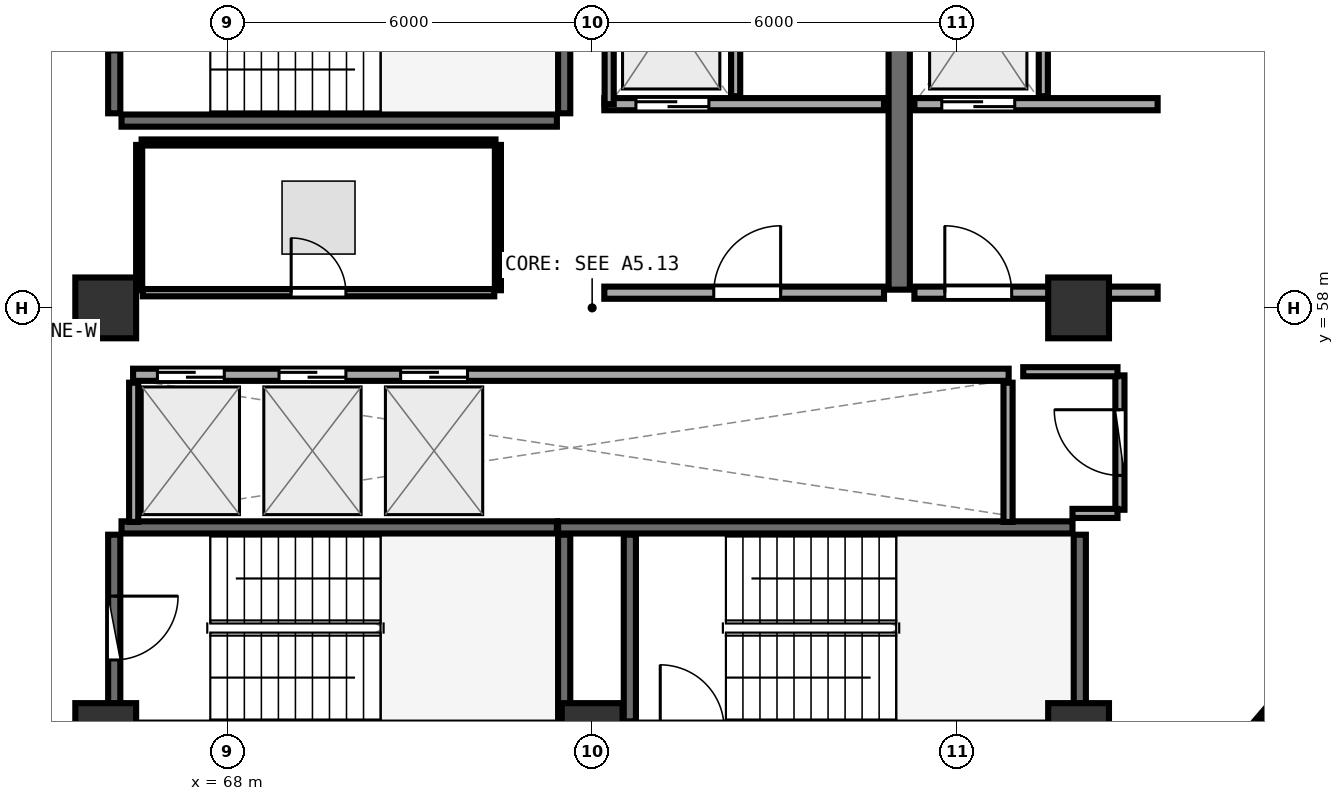
"""IFC4 building model, lengths in metres.
Left out: names, types, materials, properties, quantities, classifications, styles, units other than length and angle.
Written with IfcOpenShell. Run it as: python <this file> out.ifc"""

import sys

from ifc_helpers import new_model, si_unit, direction, frame, frame_2d, origin, origin_2d, place, context, subcontext, project, spatial, rectangle, extrude, element, fill, save


model = new_model("IFC4")
c1 = context("Model", 3, precision=1e-05, world=origin(), true_north=direction((0.0, 1.0)))
c2 = subcontext(c1, "Body", "Model", "MODEL_VIEW")
j1 = project(units=[si_unit("LENGTHUNIT", "METRE"), si_unit("PLANEANGLEUNIT", "RADIAN")], contexts=[c1])
p1 = place(None, origin())
s1 = spatial("IfcSite", under=j1, at=p1, CompositionType="ELEMENT")
p2 = place(p1, origin())
s2 = spatial("IfcBuilding", under=s1, at=p2, CompositionType="ELEMENT")
p3 = place(p2, frame((0.0, 0.0, 234.45)))
s3 = spatial("IfcBuildingStorey", under=s2, at=p3, CompositionType="ELEMENT", Elevation=234.45)
for number, where, z_axis, x_axis in (
    (1, (66.0, 51.0, 0.0), (0.0, 0.0, 1.0), (1.0, 0.0, 0.0)),
    (2, (74.0, 51.0, 0.0), (0.0, 0.0, 1.0), (1.0, 0.0, 0.0)),
    (3, (82.0, 51.0, 0.0), (0.0, 0.0, 1.0), (1.0, 0.0, 0.0)),
    (4, (82.0, 58.0, 0.0), (0.0, 0.0, 1.0), (1.0, 0.0, 0.0)),
    (5, (66.0, 58.0, 0.0), (0.0, 0.0, 1.0), (1.0, 0.0, 0.0)),
):
    element("IfcColumn", number, at=place(p3, frame(where, z_axis=z_axis, x_axis=x_axis)), inside=s3, PredefinedType="PILASTER", context=c2, shape_type="SweptSolid", body=[
        extrude(rectangle(XDim=1.0, YDim=1.0, at=origin_2d()), origin(), (0.0, 0.0, 1.0), 3.75),
    ])
p4 = place(p3, frame((66.26, 61.08, 0.0), z_axis=(0.0, 0.0, 1.0), x_axis=(1.0, 0.0, 0.0)))
e6 = element("IfcWall", 6, at=p4, inside=s3, PredefinedType="SHEAR", context=c2, shape_type="SweptSolid", body=[
    extrude(rectangle(XDim=7.16, YDim=0.2, at=frame_2d((3.58, 0.0))), origin(), (0.0, 0.0, 1.0), 3.49),
])
p5 = place(p3, frame((73.54, 61.2, 0.0), z_axis=(0.0, 0.0, 1.0), x_axis=(0.0, 1.0, 0.0)))
e7 = element("IfcWall", 7, at=p5, inside=s3, PredefinedType="SHEAR", context=c2, shape_type="SweptSolid", body=[
    extrude(rectangle(XDim=3.07, YDim=0.2, at=frame_2d((1.535, 0.0))), origin(), (0.0, 0.0, 1.0), 3.49),
])
p6 = place(p3, frame((66.14, 64.27, 0.0), z_axis=(0.0, 0.0, 1.0), x_axis=(0.0, -1.0, 0.0)))
e8 = element("IfcWall", 8, at=p6, inside=s3, PredefinedType="SHEAR", context=c2, shape_type="SweptSolid", body=[
    extrude(rectangle(XDim=3.07, YDim=0.2, at=frame_2d((1.535, 0.0))), origin(), (0.0, 0.0, 1.0), 3.49),
])
p7 = place(p6, frame((1.01, 0.0, 0.0)))
e9 = element("IfcOpeningElement", 9, at=p7, cuts=e8, PredefinedType="OPENING", context=c2, shape_type="SweptSolid", body=[
    extrude(rectangle(XDim=1.05, YDim=2.1, at=frame_2d((0.525, 1.05))), frame((0.0, 0.11, 0.0), z_axis=(0.0, -1.0, 0.0), x_axis=(1.0, 0.0, 0.0)), (0.0, 0.0, 1.0), 0.22),
])
p8 = place(p3, frame((82.02, 51.2, 0.0), z_axis=(0.0, 0.0, 1.0), x_axis=(0.0, 1.0, 0.0)))
e10 = element("IfcWall", 10, at=p8, inside=s3, PredefinedType="SHEAR", context=c2, shape_type="SweptSolid", body=[
    extrude(rectangle(XDim=3.07, YDim=0.2, at=frame_2d((1.535, 0.0))), origin(), (0.0, 0.0, 1.0), 3.49),
])
p9 = place(p3, frame((81.9, 54.39, 0.0), z_axis=(0.0, 0.0, 1.0), x_axis=(-1.0, 0.0, 0.0)))
e11 = element("IfcWall", 11, at=p9, inside=s3, PredefinedType="SHEAR", context=c2, shape_type="SweptSolid", body=[
    extrude(rectangle(XDim=8.46, YDim=0.2, at=frame_2d((4.23, 0.0))), origin(), (0.0, 0.0, 1.0), 3.49),
])
for number, where, z_axis, x_axis in (
    (12, (74.62, 54.27, 0.0), (0.0, 0.0, 1.0), (0.0, -1.0, 0.0)),
    (13, (73.54, 51.2, 0.0), (0.0, 0.0, 1.0), (0.0, 1.0, 0.0)),
):
    element("IfcWall", number, at=place(p3, frame(where, z_axis=z_axis, x_axis=x_axis)), inside=s3, PredefinedType="SHEAR", context=c2, shape_type="SweptSolid", body=[
        extrude(rectangle(XDim=3.07, YDim=0.2, at=frame_2d((1.535, 0.0))), origin(), (0.0, 0.0, 1.0), 3.49),
    ])
p10 = place(p3, frame((73.42, 54.39, 0.0), z_axis=(0.0, 0.0, 1.0), x_axis=(-1.0, 0.0, 0.0)))
e14 = element("IfcWall", 14, at=p10, inside=s3, PredefinedType="SHEAR", context=c2, shape_type="SweptSolid", body=[
    extrude(rectangle(XDim=7.16, YDim=0.2, at=frame_2d((3.58, 0.0))), origin(), (0.0, 0.0, 1.0), 3.49),
])
p11 = place(p3, frame((66.14, 54.27, 0.0), z_axis=(0.0, 0.0, 1.0), x_axis=(0.0, -1.0, 0.0)))
e15 = element("IfcWall", 15, at=p11, inside=s3, PredefinedType="SHEAR", context=c2, shape_type="SweptSolid", body=[
    extrude(rectangle(XDim=3.07, YDim=0.2, at=frame_2d((1.535, 0.0))), origin(), (0.0, 0.0, 1.0), 3.49),
])
p12 = place(p11, frame((1.01, 0.0, 0.0)))
e16 = element("IfcOpeningElement", 16, at=p12, cuts=e15, PredefinedType="OPENING", context=c2, shape_type="SweptSolid", body=[
    extrude(rectangle(XDim=1.05, YDim=2.1, at=frame_2d((0.525, 1.05))), frame((0.0, 0.11, 0.0), z_axis=(0.0, -1.0, 0.0), x_axis=(1.0, 0.0, 0.0)), (0.0, 0.0, 1.0), 0.22),
])
p13 = place(p3, frame((79.05, 58.3, 0.0), z_axis=(0.0, 0.0, 1.0), x_axis=(0.0, 1.0, 0.0)))
e17 = element("IfcWall", 17, at=p13, inside=s3, PredefinedType="SHEAR", context=c2, shape_type="SweptSolid", body=[
    extrude(rectangle(XDim=6.3, YDim=0.35, at=frame_2d((3.15, 0.0))), origin(), (0.0, 0.0, 1.0), 3.49),
])
p14 = place(p3, frame((74.2, 61.35, 0.0), z_axis=(0.0, 0.0, 1.0), x_axis=(1.0, 0.0, 0.0)))
e18 = element("IfcWall", 18, at=p14, inside=s3, PredefinedType="SOLIDWALL", context=c2, shape_type="SweptSolid", body=[
    extrude(rectangle(XDim=4.6, YDim=0.2, at=frame_2d((2.3, 0.0))), origin(), (0.0, 0.0, 1.0), 3.48),
])
p15 = place(p14, frame((0.52, 0.0, 0.0)))
e19 = element("IfcOpeningElement", 19, at=p15, cuts=e18, PredefinedType="OPENING", context=c2, shape_type="SweptSolid", body=[
    extrude(rectangle(XDim=1.2, YDim=2.15, at=frame_2d((0.6, 1.075))), frame((0.0, 0.11, 0.0), z_axis=(0.0, -1.0, 0.0), x_axis=(1.0, 0.0, 0.0)), (0.0, 0.0, 1.0), 0.22),
])
p16 = place(p3, frame((74.28, 61.35, 0.0), z_axis=(0.0, 0.0, 1.0), x_axis=(0.0, 1.0, 0.0)))
e20 = element("IfcWall", 20, at=p16, inside=s3, PredefinedType="PARTITIONING", context=c2, shape_type="SweptSolid", body=[
    extrude(rectangle(XDim=2.97, YDim=0.15, at=frame_2d((1.485, 0.0))), origin(), (0.0, 0.0, 1.0), 3.48),
])
p17 = place(p3, frame((76.36, 61.48, 0.0), z_axis=(0.0, 0.0, 1.0), x_axis=(0.0, 1.0, 0.0)))
e21 = element("IfcWall", 21, at=p17, inside=s3, PredefinedType="PARTITIONING", context=c2, shape_type="SweptSolid", body=[
    extrude(rectangle(XDim=2.84, YDim=0.15, at=frame_2d((1.42, 0.0))), origin(), (0.0, 0.0, 1.0), 3.48),
])
p18 = place(p3, frame((79.3, 61.35, 0.0), z_axis=(0.0, 0.0, 1.0), x_axis=(1.0, 0.0, 0.0)))
e22 = element("IfcWall", 22, at=p18, inside=s3, PredefinedType="SOLIDWALL", context=c2, shape_type="SweptSolid", body=[
    extrude(rectangle(XDim=4.0, YDim=0.2, at=frame_2d((2.0, 0.0))), origin(), (0.0, 0.0, 1.0), 2.775),
])
p19 = place(p18, frame((0.45, 0.0, 0.0)))
e23 = element("IfcOpeningElement", 23, at=p19, cuts=e22, PredefinedType="OPENING", context=c2, shape_type="SweptSolid", body=[
    extrude(rectangle(XDim=1.2, YDim=2.15, at=frame_2d((0.6, 1.075))), frame((0.0, 0.11, 0.0), z_axis=(0.0, -1.0, 0.0), x_axis=(1.0, 0.0, 0.0)), (0.0, 0.0, 1.0), 0.22),
])
p20 = place(p3, frame((81.42, 61.48, 0.0), z_axis=(0.0, 0.0, 1.0), x_axis=(0.0, 1.0, 0.0)))
e24 = element("IfcWall", 24, at=p20, inside=s3, PredefinedType="PARTITIONING", context=c2, shape_type="SweptSolid", body=[
    extrude(rectangle(XDim=2.84, YDim=0.15, at=frame_2d((1.42, 0.0))), origin(), (0.0, 0.0, 1.0), 3.48),
])
p21 = place(p3, frame((74.2, 58.25, 0.0), z_axis=(0.0, 0.0, 1.0), x_axis=(1.0, 0.0, 0.0)))
e25 = element("IfcWall", 25, at=p21, inside=s3, PredefinedType="SOLIDWALL", context=c2, shape_type="SweptSolid", body=[
    extrude(rectangle(XDim=4.6, YDim=0.2, at=frame_2d((2.3, 0.0))), origin(), (0.0, 0.0, 1.0), 3.48),
])
p22 = place(p21, frame((1.8, 0.0, 0.0)))
e26 = element("IfcOpeningElement", 26, at=p22, cuts=e25, PredefinedType="OPENING", context=c2, shape_type="SweptSolid", body=[
    extrude(rectangle(XDim=1.1, YDim=2.1, at=frame_2d((0.55, 1.05))), frame((0.0, 0.11, 0.0), z_axis=(0.0, -1.0, 0.0), x_axis=(1.0, 0.0, 0.0)), (0.0, 0.0, 1.0), 0.22),
])
p23 = place(p3, frame((79.3, 58.25, 0.0), z_axis=(0.0, 0.0, 1.0), x_axis=(1.0, 0.0, 0.0)))
e27 = element("IfcWall", 27, at=p23, inside=s3, PredefinedType="SOLIDWALL", context=c2, shape_type="SweptSolid", body=[
    extrude(rectangle(XDim=4.0, YDim=0.2, at=frame_2d((2.0, 0.0))), origin(), (0.0, 0.0, 1.0), 2.775),
])
p24 = place(p23, frame((0.5, 0.0, 0.0)))
e28 = element("IfcOpeningElement", 28, at=p24, cuts=e27, PredefinedType="OPENING", context=c2, shape_type="SweptSolid", body=[
    extrude(rectangle(XDim=1.1, YDim=2.1, at=frame_2d((0.55, 1.05))), frame((0.0, 0.11, 0.0), z_axis=(0.0, -1.0, 0.0), x_axis=(1.0, 0.0, 0.0)), (0.0, 0.0, 1.0), 0.22),
])
p25 = place(p3, frame((66.45, 56.9, 0.0), z_axis=(0.0, 0.0, 1.0), x_axis=(1.0, 0.0, 0.0)))
e29 = element("IfcWall", 29, at=p25, inside=s3, PredefinedType="SOLIDWALL", context=c2, shape_type="SweptSolid", body=[
    extrude(rectangle(XDim=14.4, YDim=0.2, at=frame_2d((7.2, 0.0))), origin(), (0.0, 0.0, 1.0), 3.48),
])
p26 = place(p25, frame((0.4, 0.0, 0.0)))
e30 = element("IfcOpeningElement", 30, at=p26, cuts=e29, PredefinedType="OPENING", context=c2, shape_type="SweptSolid", body=[
    extrude(rectangle(XDim=1.1, YDim=2.1, at=frame_2d((0.55, 1.05))), frame((0.0, 0.11, 0.0), z_axis=(0.0, -1.0, 0.0), x_axis=(1.0, 0.0, 0.0)), (0.0, 0.0, 1.0), 0.22),
])
p27 = place(p25, frame((2.4, 0.0, 0.0)))
e31 = element("IfcOpeningElement", 31, at=p27, cuts=e29, PredefinedType="OPENING", context=c2, shape_type="SweptSolid", body=[
    extrude(rectangle(XDim=1.1, YDim=2.1, at=frame_2d((0.55, 1.05))), frame((0.0, 0.11, 0.0), z_axis=(0.0, -1.0, 0.0), x_axis=(1.0, 0.0, 0.0)), (0.0, 0.0, 1.0), 0.22),
])
p28 = place(p25, frame((4.4, 0.0, 0.0)))
e32 = element("IfcOpeningElement", 32, at=p28, cuts=e29, PredefinedType="OPENING", context=c2, shape_type="SweptSolid", body=[
    extrude(rectangle(XDim=1.1, YDim=2.1, at=frame_2d((0.55, 1.05))), frame((0.0, 0.11, 0.0), z_axis=(0.0, -1.0, 0.0), x_axis=(1.0, 0.0, 0.0)), (0.0, 0.0, 1.0), 0.22),
])
for number, where, z_axis, x_axis in (
    (33, (66.46, 54.48, 0.0), (0.0, 0.0, 1.0), (0.0, 1.0, 0.0)),
    (34, (80.84, 54.48, 0.0), (0.0, 0.0, 1.0), (0.0, 1.0, 0.0)),
):
    element("IfcWall", number, at=place(p3, frame(where, z_axis=z_axis, x_axis=x_axis)), inside=s3, PredefinedType="PARTITIONING", context=c2, shape_type="SweptSolid", body=[
        extrude(rectangle(XDim=2.29, YDim=0.15, at=frame_2d((1.145, 0.0))), origin(), (0.0, 0.0, 1.0), 3.48),
    ])
p29 = place(p3, frame((82.68, 54.68, 0.0), z_axis=(0.0, 0.0, 1.0), x_axis=(0.0, 1.0, 0.0)))
e35 = element("IfcWall", 35, at=p29, inside=s3, PredefinedType="PARTITIONING", context=c2, shape_type="SweptSolid", body=[
    extrude(rectangle(XDim=2.21, YDim=0.15, at=frame_2d((1.105, 0.0))), origin(), (0.0, 0.0, 1.0), 3.48),
])
p30 = place(p29, frame((0.565, 0.0, 0.0)))
e36 = element("IfcOpeningElement", 36, at=p30, cuts=e35, PredefinedType="OPENING", context=c2, shape_type="SweptSolid", body=[
    extrude(rectangle(XDim=1.08, YDim=2.1, at=frame_2d((0.54, 1.05))), frame((0.0, 0.085, 0.0), z_axis=(0.0, -1.0, 0.0), x_axis=(1.0, 0.0, 0.0)), (0.0, 0.0, 1.0), 0.17),
])
p31 = place(p3, frame((66.61, 58.25, 0.0), z_axis=(0.0, 0.0, 1.0), x_axis=(1.0, 0.0, 0.0)))
e37 = element("IfcWall", 37, at=p31, inside=s3, PredefinedType="PARTITIONING", context=c2, shape_type="SweptSolid", body=[
    extrude(rectangle(XDim=5.78, YDim=0.12, at=frame_2d((2.89, 0.0))), origin(), (0.0, 0.0, 1.0), 3.48),
])
p32 = place(p31, frame((2.44, 0.0, 0.0)))
e38 = element("IfcOpeningElement", 38, at=p32, cuts=e37, PredefinedType="OPENING", context=c2, shape_type="SweptSolid", body=[
    extrude(rectangle(XDim=0.9, YDim=2.08, at=frame_2d((0.45, 1.04))), frame((0.0, 0.07, 0.0), z_axis=(0.0, -1.0, 0.0), x_axis=(1.0, 0.0, 0.0)), (0.0, 0.0, 1.0), 0.14),
])
p33 = place(p3, frame((81.9, 54.62, 0.0), z_axis=(0.0, 0.0, 1.0), x_axis=(1.0, 0.0, 0.0)))
e39 = element("IfcWall", 39, at=p33, inside=s3, PredefinedType="PARTITIONING", context=c2, shape_type="SweptSolid", body=[
    extrude(rectangle(XDim=0.74, YDim=0.15, at=frame_2d((0.37, 0.0))), origin(), (0.0, 0.0, 1.0), 2.775),
])
p34 = place(p3, frame((82.64, 56.95, 0.0), z_axis=(0.0, 0.0, 1.0), x_axis=(-1.0, 0.0, 0.0)))
e40 = element("IfcWall", 40, at=p34, inside=s3, PredefinedType="PARTITIONING", context=c2, shape_type="SweptSolid", body=[
    extrude(rectangle(XDim=1.55, YDim=0.15, at=frame_2d((0.775, 0.0))), origin(), (0.0, 0.0, 1.0), 2.775),
])
p35 = place(p3, frame((72.45, 58.29, 0.0), z_axis=(0.0, 0.0, 1.0), x_axis=(0.0, 1.0, 0.0)))
e41 = element("IfcWall", 41, at=p35, inside=s3, PredefinedType="PARTITIONING", context=c2, shape_type="SweptSolid", body=[
    extrude(rectangle(XDim=2.39, YDim=0.1, at=frame_2d((1.195, 0.0))), origin(), (0.0, 0.0, 1.0), 3.48),
])
p36 = place(p3, frame((72.41, 60.72, 0.0), z_axis=(0.0, 0.0, 1.0), x_axis=(-1.0, 0.0, 0.0)))
e42 = element("IfcWall", 42, at=p36, inside=s3, PredefinedType="PARTITIONING", context=c2, shape_type="SweptSolid", body=[
    extrude(rectangle(XDim=5.82, YDim=0.1, at=frame_2d((2.91, 0.0))), origin(), (0.0, 0.0, 1.0), 3.48),
])
p37 = place(p3, frame((66.55, 60.68, 0.0), z_axis=(0.0, 0.0, 1.0), x_axis=(0.0, -1.0, 0.0)))
e43 = element("IfcWall", 43, at=p37, inside=s3, PredefinedType="PARTITIONING", context=c2, shape_type="SweptSolid", body=[
    extrude(rectangle(XDim=2.39, YDim=0.1, at=frame_2d((1.195, 0.0))), origin(), (0.0, 0.0, 1.0), 3.48),
])
p38 = place(p3, frame((82.488, 48.32, 0.0), z_axis=(0.0, 0.0, 1.0), x_axis=(0.650415654335, 0.759578486133, 0.0)))
e44 = element("IfcWall", 44, at=p38, inside=s3, PredefinedType="PARTITIONING", context=c2, shape_type="SweptSolid", body=[
    extrude(rectangle(XDim=6.316, YDim=0.1, at=frame_2d((3.158, 0.0))), origin(), (0.0, 0.0, 1.0), 3.025),
])
p39 = place(p12, origin())
e45 = element("IfcDoor", 45, at=p39, inside=s3, OperationType="SINGLE_SWING_LEFT", PredefinedType="DOOR", context=c2, shape_type="SweptSolid", body=[
    extrude(rectangle(XDim=1.05, YDim=2.1, at=frame_2d((0.525, 1.05))), frame((0.0, 0.025, 0.0), z_axis=(0.0, -1.0, 0.0), x_axis=(1.0, 0.0, 0.0)), (0.0, 0.0, 1.0), 0.05),
])
fill(e16, e45)
p40 = place(p15, origin())
e46 = element("IfcDoor", 46, at=p40, inside=s3, OperationType="DOUBLE_DOOR_SLIDING", PredefinedType="DOOR", context=c2, shape_type="SweptSolid", body=[
    extrude(rectangle(XDim=1.2, YDim=2.15, at=frame_2d((0.6, 1.075))), frame((0.0, 0.025, 0.0), z_axis=(0.0, -1.0, 0.0), x_axis=(1.0, 0.0, 0.0)), (0.0, 0.0, 1.0), 0.05),
])
fill(e19, e46)
p41 = place(p19, origin())
e47 = element("IfcDoor", 47, at=p41, inside=s3, OperationType="DOUBLE_DOOR_SLIDING", PredefinedType="DOOR", context=c2, shape_type="SweptSolid", body=[
    extrude(rectangle(XDim=1.2, YDim=2.15, at=frame_2d((0.6, 1.075))), frame((0.0, 0.025, 0.0), z_axis=(0.0, -1.0, 0.0), x_axis=(1.0, 0.0, 0.0)), (0.0, 0.0, 1.0), 0.05),
])
fill(e23, e47)
p42 = place(p22, frame((1.1, 0.0, 0.0), z_axis=(0.0, 0.0, 1.0), x_axis=(-1.0, 0.0, 0.0)))
e48 = element("IfcDoor", 48, at=p42, inside=s3, OperationType="SINGLE_SWING_LEFT", PredefinedType="DOOR", context=c2, shape_type="SweptSolid", body=[
    extrude(rectangle(XDim=1.1, YDim=2.1, at=frame_2d((0.55, 1.05))), frame((0.0, 0.025, 0.0), z_axis=(0.0, -1.0, 0.0), x_axis=(1.0, 0.0, 0.0)), (0.0, 0.0, 1.0), 0.05),
])
fill(e26, e48)
p43 = place(p24, frame((1.1, 0.0, 0.0), z_axis=(0.0, 0.0, 1.0), x_axis=(-1.0, 0.0, 0.0)))
e49 = element("IfcDoor", 49, at=p43, inside=s3, OperationType="SINGLE_SWING_RIGHT", PredefinedType="DOOR", context=c2, shape_type="SweptSolid", body=[
    extrude(rectangle(XDim=1.1, YDim=2.1, at=frame_2d((0.55, 1.05))), frame((0.0, 0.025, 0.0), z_axis=(0.0, -1.0, 0.0), x_axis=(1.0, 0.0, 0.0)), (0.0, 0.0, 1.0), 0.05),
])
fill(e28, e49)
p44 = place(p26, origin())
e50 = element("IfcDoor", 50, at=p44, inside=s3, OperationType="DOUBLE_DOOR_SLIDING", PredefinedType="DOOR", context=c2, shape_type="SweptSolid", body=[
    extrude(rectangle(XDim=1.1, YDim=2.1, at=frame_2d((0.55, 1.05))), frame((0.0, 0.025, 0.0), z_axis=(0.0, -1.0, 0.0), x_axis=(1.0, 0.0, 0.0)), (0.0, 0.0, 1.0), 0.05),
])
fill(e30, e50)
p45 = place(p27, origin())
e51 = element("IfcDoor", 51, at=p45, inside=s3, OperationType="DOUBLE_DOOR_SLIDING", PredefinedType="DOOR", context=c2, shape_type="SweptSolid", body=[
    extrude(rectangle(XDim=1.1, YDim=2.1, at=frame_2d((0.55, 1.05))), frame((0.0, 0.025, 0.0), z_axis=(0.0, -1.0, 0.0), x_axis=(1.0, 0.0, 0.0)), (0.0, 0.0, 1.0), 0.05),
])
fill(e31, e51)
p46 = place(p28, origin())
e52 = element("IfcDoor", 52, at=p46, inside=s3, OperationType="DOUBLE_DOOR_SLIDING", PredefinedType="DOOR", context=c2, shape_type="SweptSolid", body=[
    extrude(rectangle(XDim=1.1, YDim=2.1, at=frame_2d((0.55, 1.05))), frame((0.0, 0.025, 0.0), z_axis=(0.0, -1.0, 0.0), x_axis=(1.0, 0.0, 0.0)), (0.0, 0.0, 1.0), 0.05),
])
fill(e32, e52)
p47 = place(p30, origin())
e53 = element("IfcDoor", 53, at=p47, inside=s3, OperationType="SINGLE_SWING_RIGHT", PredefinedType="DOOR", context=c2, shape_type="SweptSolid", body=[
    extrude(rectangle(XDim=1.08, YDim=2.1, at=frame_2d((0.54, 1.05))), frame((0.0, 0.025, 0.0), z_axis=(0.0, -1.0, 0.0), x_axis=(1.0, 0.0, 0.0)), (0.0, 0.0, 1.0), 0.05),
])
fill(e36, e53)
p48 = place(p32, origin())
e54 = element("IfcDoor", 54, at=p48, inside=s3, OperationType="SINGLE_SWING_LEFT", PredefinedType="DOOR", context=c2, shape_type="SweptSolid", body=[
    extrude(rectangle(XDim=0.9, YDim=2.08, at=frame_2d((0.45, 1.04))), frame((0.0, 0.025, 0.0), z_axis=(0.0, -1.0, 0.0), x_axis=(1.0, 0.0, 0.0)), (0.0, 0.0, 1.0), 0.05),
])
fill(e38, e54)
save(model, sys.argv[1])
